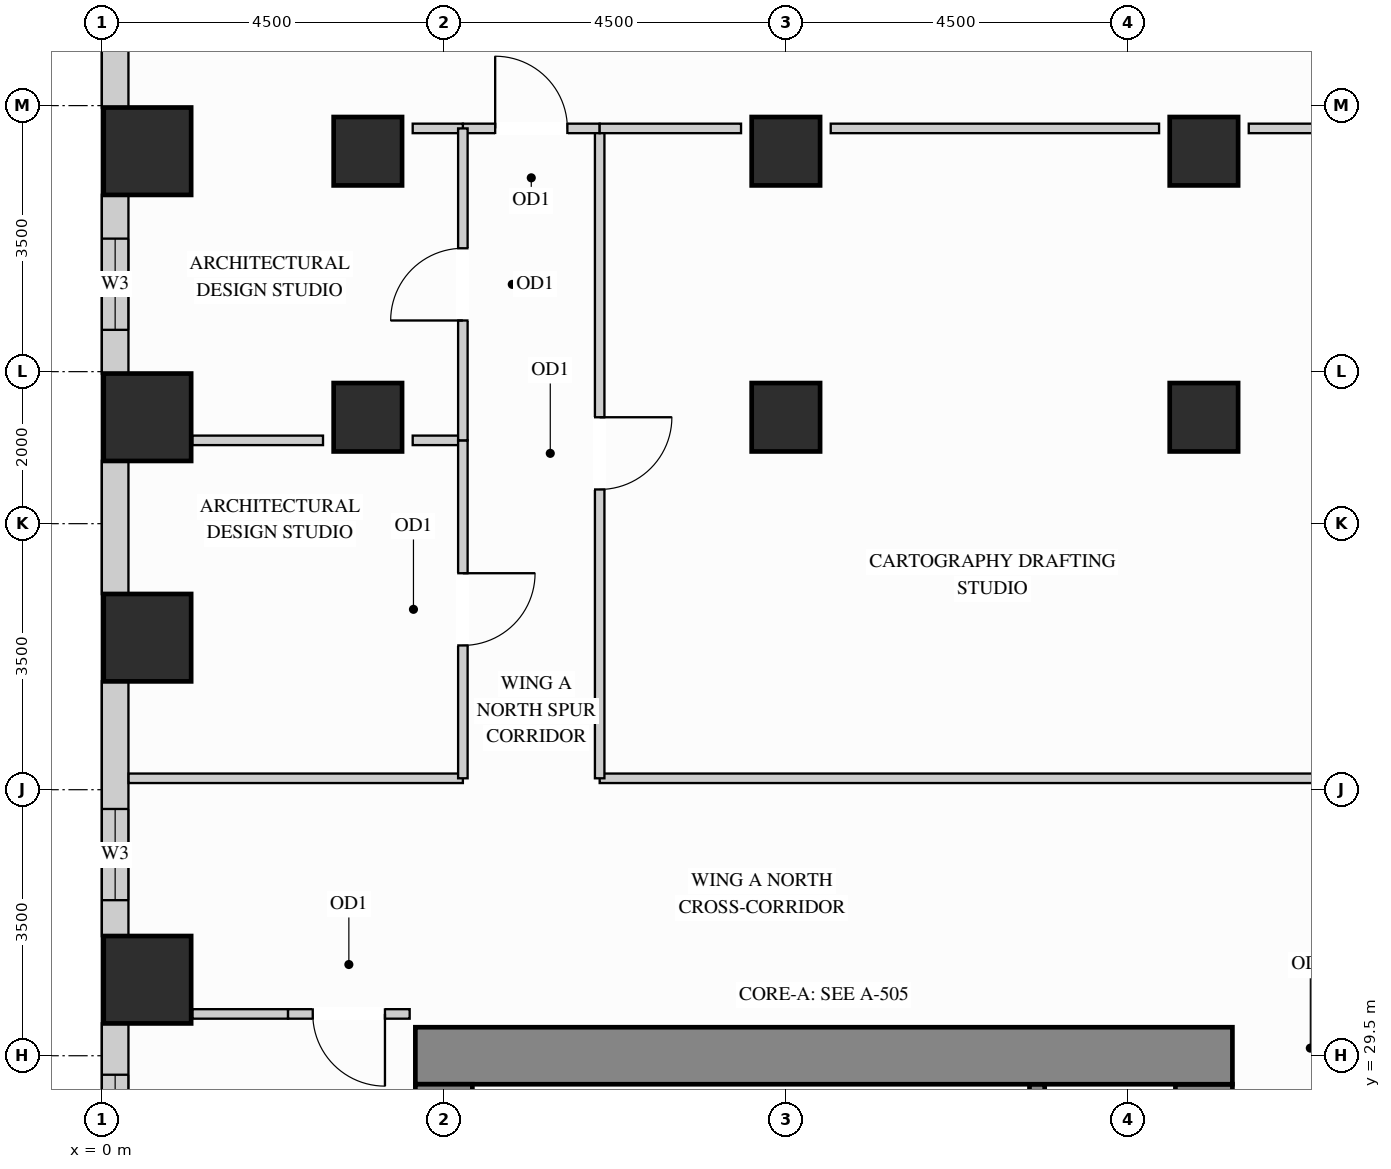
"""IFC4 building model, lengths in metres.
Left out: names, types, materials, properties, quantities, classifications, styles, units other than length and angle.
Written with IfcOpenShell. Run it as: python <this file> out.ifc"""

import sys

from ifc_helpers import new_model, si_unit, direction, frame, frame_2d, origin, origin_2d, place, context, subcontext, project, spatial, rectangle, extrude, source, transform, mapped, element, fill, save


model = new_model("IFC4")
c1 = context("Model", 3, precision=1e-05, world=origin(), true_north=direction((0.0, 1.0)))
c2 = subcontext(c1, "Body", "Model", "MODEL_VIEW")
j1 = project(units=[si_unit("LENGTHUNIT", "METRE"), si_unit("PLANEANGLEUNIT", "RADIAN")], contexts=[c1])
p1 = place(None, origin())
s1 = spatial("IfcSite", under=j1, at=p1, CompositionType="ELEMENT")
p2 = place(p1, origin())
s2 = spatial("IfcBuilding", under=s1, at=p2, CompositionType="ELEMENT")
p3 = place(p2, frame((0.0, 0.0, 135.0)))
s3 = spatial("IfcBuildingStorey", under=s2, at=p3, CompositionType="ELEMENT", Elevation=135.0)
m1 = source(origin(), c2, "Body", "SweptSolid", [
    extrude(rectangle(XDim=0.9, YDim=0.9, at=origin_2d()), origin(), (0.0, 0.0, 1.0), 3.32),
])
for number, where, z_axis, x_axis in (
    (1, (14.5, 37.9, 0.0), (0.0, 0.0, 1.0), (1.0, 0.0, 0.0)),
    (2, (14.5, 41.4, 0.0), (0.0, 0.0, 1.0), (1.0, 0.0, 0.0)),
    (3, (3.5, 37.9, 0.0), (0.0, 0.0, 1.0), (1.0, 0.0, 0.0)),
    (4, (3.5, 41.4, 0.0), (0.0, 0.0, 1.0), (1.0, 0.0, 0.0)),
    (5, (9.0, 37.9, 0.0), (0.0, 0.0, 1.0), (1.0, 0.0, 0.0)),
    (6, (9.0, 41.4, 0.0), (0.0, 0.0, 1.0), (1.0, 0.0, 0.0)),
):
    element("IfcColumn", number, at=place(p3, frame(where, z_axis=z_axis, x_axis=x_axis)), inside=s3, PredefinedType="COLUMN", context=c2, shape_type="MappedRepresentation", body=[
        mapped(m1, transform((0.0, 0.0, 0.0), x_axis=(1.0, 0.0, 0.0), y_axis=(0.0, 1.0, 0.0), z_axis=(0.0, 0.0, 1.0))),
    ])
m2 = source(origin(), c2, "Body", "SweptSolid", [
    extrude(rectangle(XDim=1.15, YDim=1.15, at=origin_2d()), origin(), (0.0, 0.0, 1.0), 3.32),
])
for number, where, z_axis, x_axis in (
    (7, (0.6, 30.5, 0.0), (0.0, 0.0, 1.0), (1.0, 0.0, 0.0)),
    (8, (0.6, 35.0, 0.0), (0.0, 0.0, 1.0), (1.0, 0.0, 0.0)),
    (9, (0.6, 37.9, 0.0), (0.0, 0.0, 1.0), (1.0, 0.0, 0.0)),
    (10, (0.6, 41.4, 0.0), (0.0, 0.0, 1.0), (1.0, 0.0, 0.0)),
):
    element("IfcColumn", number, at=place(p3, frame(where, z_axis=z_axis, x_axis=x_axis)), inside=s3, PredefinedType="COLUMN", context=c2, shape_type="MappedRepresentation", body=[
        mapped(m2, transform((0.0, 0.0, 0.0), x_axis=(1.0, 0.0, 0.0), y_axis=(0.0, 1.0, 0.0), z_axis=(0.0, 0.0, 1.0))),
    ])
m3 = source(origin(), c2, "Body", "SweptSolid", [
    extrude(rectangle(XDim=8.245, YDim=0.75, at=frame_2d((4.123, 0.0))), origin(), (0.0, 0.0, 1.0), 3.32),
])
p4 = place(p3, frame((14.5, 20.88, 0.0), z_axis=(0.0, 0.0, 1.0), x_axis=(0.0, 1.0, 0.0)))
e11 = element("IfcWall", 11, at=p4, inside=s3, PredefinedType="SHEAR", context=c2, shape_type="MappedRepresentation", body=[
    mapped(m3, transform((0.0, 0.0, 0.0), x_axis=(1.0, 0.0, 0.0), y_axis=(0.0, 1.0, 0.0), z_axis=(0.0, 0.0, 1.0))),
])
m4 = source(origin(), c2, "Body", "SweptSolid", [
    extrude(rectangle(XDim=10.75, YDim=0.75, at=frame_2d((5.375, 0.0))), origin(), (0.0, 0.0, 1.0), 3.32),
])
p5 = place(p3, frame((4.125, 29.5, 0.0), z_axis=(0.0, 0.0, 1.0), x_axis=(1.0, 0.0, 0.0)))
e12 = element("IfcWall", 12, at=p5, inside=s3, PredefinedType="SHEAR", context=c2, shape_type="MappedRepresentation", body=[
    mapped(m4, transform((0.0, 0.0, 0.0), x_axis=(1.0, 0.0, 0.0), y_axis=(0.0, 1.0, 0.0), z_axis=(0.0, 0.0, 1.0))),
])
m5 = source(origin(), c2, "Body", "SweptSolid", [
    extrude(rectangle(XDim=20.25, YDim=0.75, at=frame_2d((10.125, 0.0))), origin(), (0.0, 0.0, 1.0), 3.32),
])
p6 = place(p3, frame((4.5, 8.875, 0.0), z_axis=(0.0, 0.0, 1.0), x_axis=(0.0, 1.0, 0.0)))
e13 = element("IfcWall", 13, at=p6, inside=s3, PredefinedType="SHEAR", context=c2, shape_type="MappedRepresentation", body=[
    mapped(m5, transform((0.0, 0.0, 0.0), x_axis=(1.0, 0.0, 0.0), y_axis=(0.0, 1.0, 0.0), z_axis=(0.0, 0.0, 1.0))),
])
m6 = source(origin(), c2, "Body", "SweptSolid", [
    extrude(rectangle(XDim=1.179, YDim=0.35, at=frame_2d((0.59, 0.0))), origin(), (0.0, 0.0, 1.0), 3.305),
])
p7 = place(p3, frame((0.175, 43.152, 0.0), z_axis=(0.0, 0.0, 1.0), x_axis=(0.0, -1.0, 0.0)))
e14 = element("IfcWall", 14, at=p7, inside=s3, PredefinedType="SOLIDWALL", context=c2, shape_type="MappedRepresentation", body=[
    mapped(m6, transform((0.0, 0.0, 0.0), x_axis=(1.0, 0.0, 0.0), y_axis=(0.0, 1.0, 0.0), z_axis=(0.0, 0.0, 1.0))),
])
p8 = place(p3, frame((0.175, 40.827, 0.0), z_axis=(0.0, 0.0, 1.0), x_axis=(0.0, -1.0, 0.0)))
e15 = element("IfcWall", 15, at=p8, inside=s3, PredefinedType="SOLIDWALL", context=c2, shape_type="SweptSolid", body=[
    extrude(rectangle(XDim=2.354, YDim=0.35, at=frame_2d((1.177, 0.0))), origin(), (0.0, 0.0, 1.0), 3.305),
])
p9 = place(p8, frame((0.577, 0.0, 0.78)))
e16 = element("IfcOpeningElement", 16, at=p9, cuts=e15, PredefinedType="OPENING", context=c2, shape_type="SweptSolid", body=[
    extrude(rectangle(XDim=1.2, YDim=2.1, at=frame_2d((0.6, 1.05))), frame((0.0, 0.185, 0.0), z_axis=(0.0, -1.0, 0.0), x_axis=(1.0, 0.0, 0.0)), (0.0, 0.0, 1.0), 0.37),
])
m7 = source(origin(), c2, "Body", "SweptSolid", [
    extrude(rectangle(XDim=1.754, YDim=0.35, at=frame_2d((0.877, 0.0))), origin(), (0.0, 0.0, 1.0), 3.305),
])
p10 = place(p3, frame((0.175, 37.327, 0.0), z_axis=(0.0, 0.0, 1.0), x_axis=(0.0, -1.0, 0.0)))
e17 = element("IfcWall", 17, at=p10, inside=s3, PredefinedType="SOLIDWALL", context=c2, shape_type="MappedRepresentation", body=[
    mapped(m7, transform((0.0, 0.0, 0.0), x_axis=(1.0, 0.0, 0.0), y_axis=(0.0, 1.0, 0.0), z_axis=(0.0, 0.0, 1.0))),
])
p11 = place(p3, frame((0.175, 34.427, 0.0), z_axis=(0.0, 0.0, 1.0), x_axis=(0.0, -1.0, 0.0)))
e18 = element("IfcWall", 18, at=p11, inside=s3, PredefinedType="SOLIDWALL", context=c2, shape_type="SweptSolid", body=[
    extrude(rectangle(XDim=3.354, YDim=0.35, at=frame_2d((1.677, 0.0))), origin(), (0.0, 0.0, 1.0), 3.305),
])
p12 = place(p11, frame((1.68, 0.0, 0.78)))
e19 = element("IfcOpeningElement", 19, at=p12, cuts=e18, PredefinedType="OPENING", context=c2, shape_type="SweptSolid", body=[
    extrude(rectangle(XDim=1.2, YDim=2.1, at=frame_2d((0.6, 1.05))), frame((0.0, 0.185, 0.0), z_axis=(0.0, -1.0, 0.0), x_axis=(1.0, 0.0, 0.0)), (0.0, 0.0, 1.0), 0.37),
])
p13 = place(p3, frame((0.175, 29.927, 0.0), z_axis=(0.0, 0.0, 1.0), x_axis=(0.0, -1.0, 0.0)))
e20 = element("IfcWall", 20, at=p13, inside=s3, PredefinedType="SOLIDWALL", context=c2, shape_type="SweptSolid", body=[
    extrude(rectangle(XDim=2.554, YDim=0.35, at=frame_2d((1.277, 0.0))), origin(), (0.0, 0.0, 1.0), 3.305),
])
p14 = place(p13, frame((0.677, 0.0, 0.78)))
e21 = element("IfcOpeningElement", 21, at=p14, cuts=e20, PredefinedType="OPENING", context=c2, shape_type="SweptSolid", body=[
    extrude(rectangle(XDim=1.2, YDim=2.1, at=frame_2d((0.6, 1.05))), frame((0.0, 0.185, 0.0), z_axis=(0.0, -1.0, 0.0), x_axis=(1.0, 0.0, 0.0)), (0.0, 0.0, 1.0), 0.37),
])
m8 = source(origin(), c2, "Body", "SweptSolid", [
    extrude(rectangle(XDim=12.598, YDim=0.125, at=frame_2d((6.299, 0.0))), origin(), (0.0, 0.0, 1.0), 3.305),
])
p15 = place(p3, frame((6.55, 33.15, 0.0), z_axis=(0.0, 0.0, 1.0), x_axis=(1.0, 0.0, 0.0)))
e22 = element("IfcWall", 22, at=p15, inside=s3, PredefinedType="PARTITIONING", context=c2, shape_type="MappedRepresentation", body=[
    mapped(m8, transform((0.0, 0.0, 0.0), x_axis=(1.0, 0.0, 0.0), y_axis=(0.0, 1.0, 0.0), z_axis=(0.0, 0.0, 1.0))),
])
m9 = source(origin(), c2, "Body", "SweptSolid", [
    extrude(rectangle(XDim=4.398, YDim=0.125, at=frame_2d((2.199, 0.0))), origin(), (0.0, 0.0, 1.0), 3.305),
])
p16 = place(p3, frame((0.352, 33.15, 0.0), z_axis=(0.0, 0.0, 1.0), x_axis=(1.0, 0.0, 0.0)))
e23 = element("IfcWall", 23, at=p16, inside=s3, PredefinedType="PARTITIONING", context=c2, shape_type="MappedRepresentation", body=[
    mapped(m9, transform((0.0, 0.0, 0.0), x_axis=(1.0, 0.0, 0.0), y_axis=(0.0, 1.0, 0.0), z_axis=(0.0, 0.0, 1.0))),
])
m10 = source(origin(), c2, "Body", "SweptSolid", [
    extrude(rectangle(XDim=1.72, YDim=0.125, at=frame_2d((0.86, 0.0))), origin(), (0.0, 0.0, 1.0), 3.305),
])
p17 = place(p3, frame((1.19, 37.596, 0.0), z_axis=(0.0, 0.0, 1.0), x_axis=(1.0, 0.0, 0.0)))
e24 = element("IfcWall", 24, at=p17, inside=s3, PredefinedType="PARTITIONING", context=c2, shape_type="MappedRepresentation", body=[
    mapped(m10, transform((0.0, 0.0, 0.0), x_axis=(1.0, 0.0, 0.0), y_axis=(0.0, 1.0, 0.0), z_axis=(0.0, 0.0, 1.0))),
])
m11 = source(origin(), c2, "Body", "SweptSolid", [
    extrude(rectangle(XDim=0.66, YDim=0.125, at=frame_2d((0.33, 0.0))), origin(), (0.0, 0.0, 1.0), 3.305),
])
p18 = place(p3, frame((4.09, 37.596, 0.0), z_axis=(0.0, 0.0, 1.0), x_axis=(1.0, 0.0, 0.0)))
e25 = element("IfcWall", 25, at=p18, inside=s3, PredefinedType="PARTITIONING", context=c2, shape_type="MappedRepresentation", body=[
    mapped(m11, transform((0.0, 0.0, 0.0), x_axis=(1.0, 0.0, 0.0), y_axis=(0.0, 1.0, 0.0), z_axis=(0.0, 0.0, 1.0))),
])
m12 = source(origin(), c2, "Body", "SweptSolid", [
    extrude(rectangle(XDim=1.26, YDim=0.125, at=frame_2d((0.63, 0.0))), origin(), (0.0, 0.0, 1.0), 3.305),
])
p19 = place(p3, frame((1.19, 30.05, 0.0), z_axis=(0.0, 0.0, 1.0), x_axis=(1.0, 0.0, 0.0)))
e26 = element("IfcWall", 26, at=p19, inside=s3, PredefinedType="PARTITIONING", context=c2, shape_type="MappedRepresentation", body=[
    mapped(m12, transform((0.0, 0.0, 0.0), x_axis=(1.0, 0.0, 0.0), y_axis=(0.0, 1.0, 0.0), z_axis=(0.0, 0.0, 1.0))),
])
p20 = place(p3, frame((2.45, 30.05, 0.0), z_axis=(0.0, 0.0, 1.0), x_axis=(1.0, 0.0, 0.0)))
e27 = element("IfcWall", 27, at=p20, inside=s3, PredefinedType="PARTITIONING", context=c2, shape_type="SweptSolid", body=[
    extrude(rectangle(XDim=1.6, YDim=0.125, at=frame_2d((0.8, 0.0))), origin(), (0.0, 0.0, 1.0), 3.305),
])
p21 = place(p20, frame((0.325, 0.0, 0.0)))
e28 = element("IfcOpeningElement", 28, at=p21, cuts=e27, PredefinedType="OPENING", context=c2, shape_type="SweptSolid", body=[
    extrude(rectangle(XDim=0.95, YDim=2.15, at=frame_2d((0.475, 1.075))), frame((0.0, 0.073, 0.0), z_axis=(0.0, -1.0, 0.0), x_axis=(1.0, 0.0, 0.0)), (0.0, 0.0, 1.0), 0.145),
])
p22 = place(p3, frame((6.55, 33.15, 0.0), z_axis=(0.0, 0.0, 1.0), x_axis=(0.0, 1.0, 0.0)))
e29 = element("IfcWall", 29, at=p22, inside=s3, PredefinedType="PARTITIONING", context=c2, shape_type="SweptSolid", body=[
    extrude(rectangle(XDim=8.55, YDim=0.125, at=frame_2d((4.275, 0.0))), origin(), (0.0, 0.0, 1.0), 3.305),
])
p23 = place(p22, frame((3.8, 0.0, 0.0)))
e30 = element("IfcOpeningElement", 30, at=p23, cuts=e29, PredefinedType="OPENING", context=c2, shape_type="SweptSolid", body=[
    extrude(rectangle(XDim=0.95, YDim=2.15, at=frame_2d((0.475, 1.075))), frame((0.0, 0.073, 0.0), z_axis=(0.0, -1.0, 0.0), x_axis=(1.0, 0.0, 0.0)), (0.0, 0.0, 1.0), 0.145),
])
p24 = place(p3, frame((4.75, 41.7, 0.0), z_axis=(0.0, 0.0, 1.0), x_axis=(1.0, 0.0, 0.0)))
e31 = element("IfcWall", 31, at=p24, inside=s3, PredefinedType="PARTITIONING", context=c2, shape_type="SweptSolid", body=[
    extrude(rectangle(XDim=1.8, YDim=0.125, at=frame_2d((0.9, 0.0))), origin(), (0.0, 0.0, 1.0), 3.305),
])
p25 = place(p24, frame((0.425, 0.0, 0.0)))
e32 = element("IfcOpeningElement", 32, at=p25, cuts=e31, PredefinedType="OPENING", context=c2, shape_type="SweptSolid", body=[
    extrude(rectangle(XDim=0.95, YDim=2.15, at=frame_2d((0.475, 1.075))), frame((0.0, 0.073, 0.0), z_axis=(0.0, -1.0, 0.0), x_axis=(1.0, 0.0, 0.0)), (0.0, 0.0, 1.0), 0.145),
])
m13 = source(origin(), c2, "Body", "SweptSolid", [
    extrude(rectangle(XDim=1.86, YDim=0.125, at=frame_2d((0.93, 0.0))), origin(), (0.0, 0.0, 1.0), 3.305),
])
p26 = place(p3, frame((6.55, 41.7, 0.0), z_axis=(0.0, 0.0, 1.0), x_axis=(1.0, 0.0, 0.0)))
e33 = element("IfcWall", 33, at=p26, inside=s3, PredefinedType="PARTITIONING", context=c2, shape_type="MappedRepresentation", body=[
    mapped(m13, transform((0.0, 0.0, 0.0), x_axis=(1.0, 0.0, 0.0), y_axis=(0.0, 1.0, 0.0), z_axis=(0.0, 0.0, 1.0))),
])
m14 = source(origin(), c2, "Body", "SweptSolid", [
    extrude(rectangle(XDim=4.32, YDim=0.125, at=frame_2d((2.16, 0.0))), origin(), (0.0, 0.0, 1.0), 3.305),
])
p27 = place(p3, frame((9.59, 41.7, 0.0), z_axis=(0.0, 0.0, 1.0), x_axis=(1.0, 0.0, 0.0)))
e34 = element("IfcWall", 34, at=p27, inside=s3, PredefinedType="PARTITIONING", context=c2, shape_type="MappedRepresentation", body=[
    mapped(m14, transform((0.0, 0.0, 0.0), x_axis=(1.0, 0.0, 0.0), y_axis=(0.0, 1.0, 0.0), z_axis=(0.0, 0.0, 1.0))),
])
m15 = source(origin(), c2, "Body", "SweptSolid", [
    extrude(rectangle(XDim=1.81, YDim=0.125, at=frame_2d((0.905, 0.0))), origin(), (0.0, 0.0, 1.0), 3.305),
])
p28 = place(p3, frame((15.09, 41.7, 0.0), z_axis=(0.0, 0.0, 1.0), x_axis=(1.0, 0.0, 0.0)))
e35 = element("IfcWall", 35, at=p28, inside=s3, PredefinedType="PARTITIONING", context=c2, shape_type="MappedRepresentation", body=[
    mapped(m15, transform((0.0, 0.0, 0.0), x_axis=(1.0, 0.0, 0.0), y_axis=(0.0, 1.0, 0.0), z_axis=(0.0, 0.0, 1.0))),
])
p29 = place(p3, frame((4.09, 41.7, 0.0), z_axis=(0.0, 0.0, 1.0), x_axis=(1.0, 0.0, 0.0)))
e36 = element("IfcWall", 36, at=p29, inside=s3, PredefinedType="PARTITIONING", context=c2, shape_type="MappedRepresentation", body=[
    mapped(m11, transform((0.0, 0.0, 0.0), x_axis=(1.0, 0.0, 0.0), y_axis=(0.0, 1.0, 0.0), z_axis=(0.0, 0.0, 1.0))),
])
p30 = place(p3, frame((4.75, 33.15, 0.0), z_axis=(0.0, 0.0, 1.0), x_axis=(0.0, 1.0, 0.0)))
e37 = element("IfcWall", 37, at=p30, inside=s3, PredefinedType="PARTITIONING", context=c2, shape_type="SweptSolid", body=[
    extrude(rectangle(XDim=4.446, YDim=0.125, at=frame_2d((2.223, 0.0))), origin(), (0.0, 0.0, 1.0), 3.305),
])
p31 = place(p30, frame((1.748, 0.0, 0.0)))
e38 = element("IfcOpeningElement", 38, at=p31, cuts=e37, PredefinedType="OPENING", context=c2, shape_type="SweptSolid", body=[
    extrude(rectangle(XDim=0.95, YDim=2.15, at=frame_2d((0.475, 1.075))), frame((0.0, 0.073, 0.0), z_axis=(0.0, -1.0, 0.0), x_axis=(1.0, 0.0, 0.0)), (0.0, 0.0, 1.0), 0.145),
])
p32 = place(p3, frame((4.75, 37.596, 0.0), z_axis=(0.0, 0.0, 1.0), x_axis=(0.0, 1.0, 0.0)))
e39 = element("IfcWall", 39, at=p32, inside=s3, PredefinedType="PARTITIONING", context=c2, shape_type="SweptSolid", body=[
    extrude(rectangle(XDim=4.104, YDim=0.125, at=frame_2d((2.052, 0.0))), origin(), (0.0, 0.0, 1.0), 3.305),
])
p33 = place(p32, frame((1.577, 0.0, 0.0)))
e40 = element("IfcOpeningElement", 40, at=p33, cuts=e39, PredefinedType="OPENING", context=c2, shape_type="SweptSolid", body=[
    extrude(rectangle(XDim=0.95, YDim=2.15, at=frame_2d((0.475, 1.075))), frame((0.0, 0.073, 0.0), z_axis=(0.0, -1.0, 0.0), x_axis=(1.0, 0.0, 0.0)), (0.0, 0.0, 1.0), 0.145),
])
m16 = source(origin(), c2, "Body", "SweptSolid", [
    extrude(rectangle(XDim=3.678, YDim=0.2, at=frame_2d((1.839, 0.0))), origin(), (0.0, 0.0, 1.0), 3.32),
])
p34 = place(p3, frame((12.305, 25.445, 0.0), z_axis=(0.0, 0.0, 1.0), x_axis=(0.0, 1.0, 0.0)))
e41 = element("IfcWall", 41, at=p34, inside=s3, PredefinedType="SHEAR", context=c2, shape_type="MappedRepresentation", body=[
    mapped(m16, transform((0.0, 0.0, 0.0), x_axis=(1.0, 0.0, 0.0), y_axis=(0.0, 1.0, 0.0), z_axis=(0.0, 0.0, 1.0))),
])
m17 = source(origin(), c2, "Body", "SweptSolid", [
    extrude(rectangle(XDim=0.95, YDim=2.15, at=frame_2d((0.475, 1.075))), frame((0.0, 0.025, 0.0), z_axis=(0.0, -1.0, 0.0), x_axis=(1.0, 0.0, 0.0)), (0.0, 0.0, 1.0), 0.05),
])
p35 = place(p23, origin())
e42 = element("IfcDoor", 42, at=p35, inside=s3, OperationType="SINGLE_SWING_RIGHT", PredefinedType="DOOR", context=c2, shape_type="MappedRepresentation", body=[
    mapped(m17, transform((0.0, 0.0, 0.0), x_axis=(1.0, 0.0, 0.0), y_axis=(0.0, 1.0, 0.0), z_axis=(0.0, 0.0, 1.0))),
])
fill(e30, e42)
p36 = place(p25, origin())
e43 = element("IfcDoor", 43, at=p36, inside=s3, OperationType="SINGLE_SWING_LEFT", PredefinedType="DOOR", context=c2, shape_type="MappedRepresentation", body=[
    mapped(m17, transform((0.0, 0.0, 0.0), x_axis=(1.0, 0.0, 0.0), y_axis=(0.0, 1.0, 0.0), z_axis=(0.0, 0.0, 1.0))),
])
fill(e32, e43)
p37 = place(p31, origin())
e44 = element("IfcDoor", 44, at=p37, inside=s3, OperationType="SINGLE_SWING_RIGHT", PredefinedType="DOOR", context=c2, shape_type="MappedRepresentation", body=[
    mapped(m17, transform((0.0, 0.0, 0.0), x_axis=(1.0, 0.0, 0.0), y_axis=(0.0, 1.0, 0.0), z_axis=(0.0, 0.0, 1.0))),
])
fill(e38, e44)
p38 = place(p33, origin())
e45 = element("IfcDoor", 45, at=p38, inside=s3, OperationType="SINGLE_SWING_LEFT", PredefinedType="DOOR", context=c2, shape_type="MappedRepresentation", body=[
    mapped(m17, transform((0.0, 0.0, 0.0), x_axis=(1.0, 0.0, 0.0), y_axis=(0.0, 1.0, 0.0), z_axis=(0.0, 0.0, 1.0))),
])
fill(e40, e45)
p39 = place(p21, origin())
e46 = element("IfcDoor", 46, at=p39, inside=s3, OperationType="SINGLE_SWING_RIGHT", PredefinedType="DOOR", context=c2, shape_type="MappedRepresentation", body=[
    mapped(m17, transform((0.0, 0.0, 0.0), x_axis=(1.0, 0.0, 0.0), y_axis=(0.0, 1.0, 0.0), z_axis=(0.0, 0.0, 1.0))),
])
fill(e28, e46)
m18 = source(origin(), c2, "Body", "SweptSolid", [
    extrude(rectangle(XDim=1.2, YDim=2.1, at=frame_2d((0.6, 1.05))), frame((0.0, 0.03, 0.0), z_axis=(0.0, -1.0, 0.0), x_axis=(1.0, 0.0, 0.0)), (0.0, 0.0, 1.0), 0.06),
])
p40 = place(p9, origin())
e47 = element("IfcWindow", 47, at=p40, inside=s3, PartitioningType="SINGLE_PANEL", PredefinedType="WINDOW", context=c2, shape_type="MappedRepresentation", body=[
    mapped(m18, transform((0.0, 0.0, 0.0), x_axis=(1.0, 0.0, 0.0), y_axis=(0.0, 1.0, 0.0), z_axis=(0.0, 0.0, 1.0))),
])
fill(e16, e47)
p41 = place(p12, origin())
e48 = element("IfcWindow", 48, at=p41, inside=s3, PartitioningType="SINGLE_PANEL", PredefinedType="WINDOW", context=c2, shape_type="MappedRepresentation", body=[
    mapped(m18, transform((0.0, 0.0, 0.0), x_axis=(1.0, 0.0, 0.0), y_axis=(0.0, 1.0, 0.0), z_axis=(0.0, 0.0, 1.0))),
])
fill(e19, e48)
p42 = place(p14, origin())
e49 = element("IfcWindow", 49, at=p42, inside=s3, PartitioningType="SINGLE_PANEL", PredefinedType="WINDOW", context=c2, shape_type="MappedRepresentation", body=[
    mapped(m18, transform((0.0, 0.0, 0.0), x_axis=(1.0, 0.0, 0.0), y_axis=(0.0, 1.0, 0.0), z_axis=(0.0, 0.0, 1.0))),
])
fill(e21, e49)
save(model, sys.argv[1])
